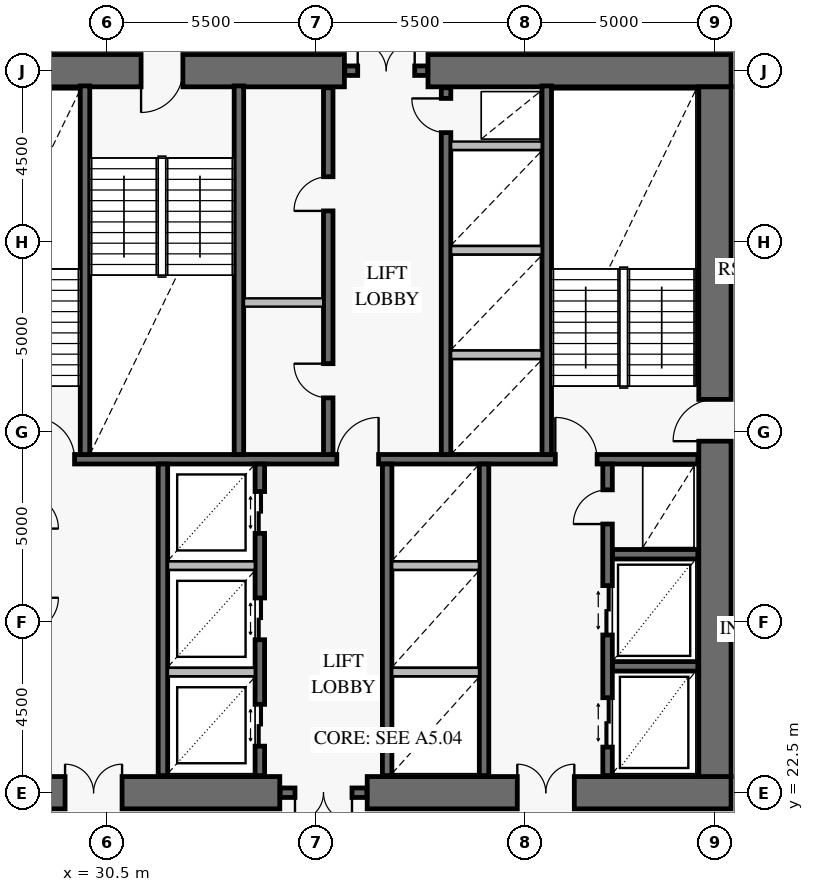
"""IFC4 building model, lengths in metres.
Left out: names, types, materials, properties, quantities, classifications, styles, units other than length and angle.
Written with IfcOpenShell. Run it as: python <this file> out.ifc"""

import sys

from ifc_helpers import new_model, si_unit, direction, frame, frame_2d, origin, place, context, subcontext, project, spatial, rectangle, extrude, element, fill, save


model = new_model("IFC4")
c1 = context("Model", 3, precision=1e-05, world=origin(), true_north=direction((0.0, 1.0)))
c2 = subcontext(c1, "Body", "Model", "MODEL_VIEW")
j1 = project(units=[si_unit("LENGTHUNIT", "METRE"), si_unit("PLANEANGLEUNIT", "RADIAN")], contexts=[c1])
p1 = place(None, origin())
s1 = spatial("IfcSite", under=j1, at=p1, CompositionType="ELEMENT")
p2 = place(p1, origin())
s2 = spatial("IfcBuilding", under=s1, at=p2, CompositionType="ELEMENT")
p3 = place(p2, frame((0.0, 0.0, 7.8)))
s3 = spatial("IfcBuildingStorey", under=s2, at=p3, CompositionType="ELEMENT", Elevation=7.8)
p4 = place(p3, frame((25.075, 22.5, 0.0), z_axis=(0.0, 0.0, 1.0), x_axis=(1.0, 0.0, 0.0)))
e1 = element("IfcWall", 1, at=p4, inside=s3, PredefinedType="SHEAR", context=c2, shape_type="SweptSolid", body=[
    extrude(rectangle(XDim=9.975, YDim=0.85, at=frame_2d((4.988, 0.0))), origin(), (0.0, 0.0, 1.0), 4.2),
])
p5 = place(p4, frame((4.325, 0.0, 0.0)))
e2 = element("IfcOpeningElement", 2, at=p5, cuts=e1, PredefinedType="OPENING", context=c2, shape_type="SweptSolid", body=[
    extrude(rectangle(XDim=1.5, YDim=2.15, at=frame_2d((0.75, 1.075))), frame((0.0, 0.437, 0.0), z_axis=(0.0, -1.0, 0.0), x_axis=(1.0, 0.0, 0.0)), (0.0, 0.0, 1.0), 0.874),
])
p6 = place(p3, frame((37.35, 22.5, 0.0), z_axis=(0.0, 0.0, 1.0), x_axis=(1.0, 0.0, 0.0)))
e3 = element("IfcWall", 3, at=p6, inside=s3, PredefinedType="SHEAR", context=c2, shape_type="SweptSolid", body=[
    extrude(rectangle(XDim=9.575, YDim=0.85, at=frame_2d((4.788, 0.0))), origin(), (0.0, 0.0, 1.0), 4.2),
])
p7 = place(p6, frame((3.95, 0.0, 0.0)))
e4 = element("IfcOpeningElement", 4, at=p7, cuts=e3, PredefinedType="OPENING", context=c2, shape_type="SweptSolid", body=[
    extrude(rectangle(XDim=1.5, YDim=2.15, at=frame_2d((0.75, 1.075))), frame((0.0, 0.437, 0.0), z_axis=(0.0, -1.0, 0.0), x_axis=(1.0, 0.0, 0.0)), (0.0, 0.0, 1.0), 0.874),
])
p8 = place(p3, frame((46.925, 41.5, 0.0), z_axis=(0.0, 0.0, 1.0), x_axis=(-1.0, 0.0, 0.0)))
e5 = element("IfcWall", 5, at=p8, inside=s3, PredefinedType="SHEAR", context=c2, shape_type="SweptSolid", body=[
    extrude(rectangle(XDim=7.975, YDim=0.85, at=frame_2d((3.988, 0.0))), origin(), (0.0, 0.0, 1.0), 4.2),
])
p9 = place(p3, frame((36.75, 41.5, 0.0), z_axis=(0.0, 0.0, 1.0), x_axis=(-1.0, 0.0, 0.0)))
e6 = element("IfcWall", 6, at=p9, inside=s3, PredefinedType="SHEAR", context=c2, shape_type="SweptSolid", body=[
    extrude(rectangle(XDim=11.675, YDim=0.85, at=frame_2d((5.837, 0.0))), origin(), (0.0, 0.0, 1.0), 4.2),
])
p10 = place(p9, frame((4.25, 0.0, 0.0)))
e7 = element("IfcOpeningElement", 7, at=p10, cuts=e6, PredefinedType="OPENING", context=c2, shape_type="SweptSolid", body=[
    extrude(rectangle(XDim=1.1, YDim=2.15, at=frame_2d((0.55, 1.075))), frame((0.0, 0.437, 0.0), z_axis=(0.0, -1.0, 0.0), x_axis=(1.0, 0.0, 0.0)), (0.0, 0.0, 1.0), 0.874),
])
p11 = place(p3, frame((46.5, 22.925, 0.0), z_axis=(0.0, 0.0, 1.0), x_axis=(0.0, 1.0, 0.0)))
e8 = element("IfcWall", 8, at=p11, inside=s3, PredefinedType="SHEAR", context=c2, shape_type="SweptSolid", body=[
    extrude(rectangle(XDim=18.15, YDim=0.85, at=frame_2d((9.075, 0.0))), origin(), (0.0, 0.0, 1.0), 4.2),
])
p12 = place(p11, frame((8.825, 0.0, 0.0)))
e9 = element("IfcOpeningElement", 9, at=p12, cuts=e8, PredefinedType="OPENING", context=c2, shape_type="SweptSolid", body=[
    extrude(rectangle(XDim=1.1, YDim=2.15, at=frame_2d((0.55, 1.075))), frame((0.0, 0.437, 0.0), z_axis=(0.0, -1.0, 0.0), x_axis=(1.0, 0.0, 0.0)), (0.0, 0.0, 1.0), 0.874),
])
p13 = place(p3, frame((35.06, 22.5, 0.0), z_axis=(0.0, 0.0, 1.0), x_axis=(1.0, 0.0, 0.0)))
e10 = element("IfcWall", 10, at=p13, inside=s3, PredefinedType="SOLIDWALL", context=c2, shape_type="SweptSolid", body=[
    extrude(rectangle(XDim=2.28, YDim=0.25, at=frame_2d((1.14, 0.0))), origin(), (0.0, 0.0, 1.0), 4.2),
])
p14 = place(p13, frame((0.39, 0.0, 0.0)))
e11 = element("IfcOpeningElement", 11, at=p14, cuts=e10, PredefinedType="OPENING", context=c2, shape_type="SweptSolid", body=[
    extrude(rectangle(XDim=1.5, YDim=2.15, at=frame_2d((0.75, 1.075))), frame((0.0, 0.137, 0.0), z_axis=(0.0, -1.0, 0.0), x_axis=(1.0, 0.0, 0.0)), (0.0, 0.0, 1.0), 0.274),
])
p15 = place(p3, frame((36.76, 41.5, 0.0), z_axis=(0.0, 0.0, 1.0), x_axis=(1.0, 0.0, 0.0)))
e12 = element("IfcWall", 12, at=p15, inside=s3, PredefinedType="SOLIDWALL", context=c2, shape_type="SweptSolid", body=[
    extrude(rectangle(XDim=2.18, YDim=0.25, at=frame_2d((1.09, 0.0))), origin(), (0.0, 0.0, 1.0), 4.2),
])
p16 = place(p15, frame((0.34, 0.0, 0.0)))
e13 = element("IfcOpeningElement", 13, at=p16, cuts=e12, PredefinedType="OPENING", context=c2, shape_type="SweptSolid", body=[
    extrude(rectangle(XDim=1.5, YDim=2.15, at=frame_2d((0.75, 1.075))), frame((0.0, 0.137, 0.0), z_axis=(0.0, -1.0, 0.0), x_axis=(1.0, 0.0, 0.0)), (0.0, 0.0, 1.0), 0.274),
])
p17 = place(p3, frame((25.95, 31.275, 0.0), z_axis=(0.0, 0.0, 1.0), x_axis=(1.0, 0.0, 0.0)))
e14 = element("IfcWall", 14, at=p17, inside=s3, PredefinedType="SOLIDWALL", context=c2, shape_type="SweptSolid", body=[
    extrude(rectangle(XDim=20.1, YDim=0.25, at=frame_2d((10.05, 0.0))), origin(), (0.0, 0.0, 1.0), 4.2),
])
p18 = place(p17, frame((2.6, 0.0, 0.0)))
e15 = element("IfcOpeningElement", 15, at=p18, cuts=e14, PredefinedType="OPENING", context=c2, shape_type="SweptSolid", body=[
    extrude(rectangle(XDim=1.1, YDim=2.15, at=frame_2d((0.55, 1.075))), frame((0.0, 0.137, 0.0), z_axis=(0.0, -1.0, 0.0), x_axis=(1.0, 0.0, 0.0)), (0.0, 0.0, 1.0), 0.274),
])
p19 = place(p17, frame((10.6, 0.0, 0.0)))
e16 = element("IfcOpeningElement", 16, at=p19, cuts=e14, PredefinedType="OPENING", context=c2, shape_type="SweptSolid", body=[
    extrude(rectangle(XDim=1.1, YDim=2.15, at=frame_2d((0.55, 1.075))), frame((0.0, 0.137, 0.0), z_axis=(0.0, -1.0, 0.0), x_axis=(1.0, 0.0, 0.0)), (0.0, 0.0, 1.0), 0.274),
])
p20 = place(p17, frame((16.35, 0.0, 0.0)))
e17 = element("IfcOpeningElement", 17, at=p20, cuts=e14, PredefinedType="OPENING", context=c2, shape_type="SweptSolid", body=[
    extrude(rectangle(XDim=1.1, YDim=2.15, at=frame_2d((0.55, 1.075))), frame((0.0, 0.137, 0.0), z_axis=(0.0, -1.0, 0.0), x_axis=(1.0, 0.0, 0.0)), (0.0, 0.0, 1.0), 0.274),
])
for number, where, z_axis, x_axis in (
    (18, (29.925, 31.4, 0.0), (0.0, 0.0, 1.0), (0.0, 1.0, 0.0)),
    (19, (33.975, 31.4, 0.0), (0.0, 0.0, 1.0), (0.0, 1.0, 0.0)),
    (20, (42.075, 31.4, 0.0), (0.0, 0.0, 1.0), (0.0, 1.0, 0.0)),
):
    element("IfcWall", number, at=place(p3, frame(where, z_axis=z_axis, x_axis=x_axis)), inside=s3, PredefinedType="SOLIDWALL", context=c2, shape_type="SweptSolid", body=[
        extrude(rectangle(XDim=9.7, YDim=0.25, at=frame_2d((4.85, 0.0))), origin(), (0.0, 0.0, 1.0), 4.2),
    ])
p21 = place(p3, frame((36.325, 31.4, 0.0), z_axis=(0.0, 0.0, 1.0), x_axis=(0.0, 1.0, 0.0)))
e21 = element("IfcWall", 21, at=p21, inside=s3, PredefinedType="SOLIDWALL", context=c2, shape_type="SweptSolid", body=[
    extrude(rectangle(XDim=9.65, YDim=0.25, at=frame_2d((4.825, 0.0))), origin(), (0.0, 0.0, 1.0), 4.2),
])
p22 = place(p21, frame((1.49, 0.0, 0.0)))
e22 = element("IfcOpeningElement", 22, at=p22, cuts=e21, PredefinedType="OPENING", context=c2, shape_type="SweptSolid", body=[
    extrude(rectangle(XDim=0.9, YDim=2.1, at=frame_2d((0.45, 1.05))), frame((0.0, 0.137, 0.0), z_axis=(0.0, -1.0, 0.0), x_axis=(1.0, 0.0, 0.0)), (0.0, 0.0, 1.0), 0.274),
])
p23 = place(p21, frame((6.41, 0.0, 0.0)))
e23 = element("IfcOpeningElement", 23, at=p23, cuts=e21, PredefinedType="OPENING", context=c2, shape_type="SweptSolid", body=[
    extrude(rectangle(XDim=0.9, YDim=2.1, at=frame_2d((0.45, 1.05))), frame((0.0, 0.137, 0.0), z_axis=(0.0, -1.0, 0.0), x_axis=(1.0, 0.0, 0.0)), (0.0, 0.0, 1.0), 0.274),
])
p24 = place(p3, frame((39.425, 31.4, 0.0), z_axis=(0.0, 0.0, 1.0), x_axis=(0.0, 1.0, 0.0)))
e24 = element("IfcWall", 24, at=p24, inside=s3, PredefinedType="SOLIDWALL", context=c2, shape_type="SweptSolid", body=[
    extrude(rectangle(XDim=9.65, YDim=0.25, at=frame_2d((4.825, 0.0))), origin(), (0.0, 0.0, 1.0), 4.2),
])
p25 = place(p24, frame((8.47, 0.0, 0.0)))
e25 = element("IfcOpeningElement", 25, at=p25, cuts=e24, PredefinedType="OPENING", context=c2, shape_type="SweptSolid", body=[
    extrude(rectangle(XDim=0.9, YDim=2.1, at=frame_2d((0.45, 1.05))), frame((0.0, 0.137, 0.0), z_axis=(0.0, -1.0, 0.0), x_axis=(1.0, 0.0, 0.0)), (0.0, 0.0, 1.0), 0.274),
])
p26 = place(p3, frame((31.975, 22.95, 0.0), z_axis=(0.0, 0.0, 1.0), x_axis=(0.0, 1.0, 0.0)))
e26 = element("IfcWall", 26, at=p26, inside=s3, PredefinedType="SOLIDWALL", context=c2, shape_type="SweptSolid", body=[
    extrude(rectangle(XDim=8.2, YDim=0.25, at=frame_2d((4.1, 0.0))), origin(), (0.0, 0.0, 1.0), 4.2),
])
p27 = place(p3, frame((34.525, 22.95, 0.0), z_axis=(0.0, 0.0, 1.0), x_axis=(0.0, 1.0, 0.0)))
e27 = element("IfcWall", 27, at=p27, inside=s3, PredefinedType="SOLIDWALL", context=c2, shape_type="SweptSolid", body=[
    extrude(rectangle(XDim=8.2, YDim=0.25, at=frame_2d((4.1, 0.0))), origin(), (0.0, 0.0, 1.0), 4.2),
])
p28 = place(p27, frame((0.775, 0.0, 0.0)))
e28 = element("IfcOpeningElement", 28, at=p28, cuts=e27, PredefinedType="OPENING", context=c2, shape_type="SweptSolid", body=[
    extrude(rectangle(XDim=1.1, YDim=2.2, at=frame_2d((0.55, 1.1))), frame((0.0, 0.137, 0.0), z_axis=(0.0, -1.0, 0.0), x_axis=(1.0, 0.0, 0.0)), (0.0, 0.0, 1.0), 0.274),
])
p29 = place(p27, frame((3.575, 0.0, 0.0)))
e29 = element("IfcOpeningElement", 29, at=p29, cuts=e27, PredefinedType="OPENING", context=c2, shape_type="SweptSolid", body=[
    extrude(rectangle(XDim=1.1, YDim=2.2, at=frame_2d((0.55, 1.1))), frame((0.0, 0.137, 0.0), z_axis=(0.0, -1.0, 0.0), x_axis=(1.0, 0.0, 0.0)), (0.0, 0.0, 1.0), 0.274),
])
p30 = place(p27, frame((6.375, 0.0, 0.0)))
e30 = element("IfcOpeningElement", 30, at=p30, cuts=e27, PredefinedType="OPENING", context=c2, shape_type="SweptSolid", body=[
    extrude(rectangle(XDim=1.1, YDim=2.2, at=frame_2d((0.55, 1.1))), frame((0.0, 0.137, 0.0), z_axis=(0.0, -1.0, 0.0), x_axis=(1.0, 0.0, 0.0)), (0.0, 0.0, 1.0), 0.274),
])
for number, where, z_axis, x_axis in (
    (31, (37.875, 22.95, 0.0), (0.0, 0.0, 1.0), (0.0, 1.0, 0.0)),
    (32, (40.425, 22.95, 0.0), (0.0, 0.0, 1.0), (0.0, 1.0, 0.0)),
):
    element("IfcWall", number, at=place(p3, frame(where, z_axis=z_axis, x_axis=x_axis)), inside=s3, PredefinedType="SOLIDWALL", context=c2, shape_type="SweptSolid", body=[
        extrude(rectangle(XDim=8.2, YDim=0.25, at=frame_2d((4.1, 0.0))), origin(), (0.0, 0.0, 1.0), 4.2),
    ])
for number, where, z_axis, x_axis in (
    (33, (43.8, 25.825, 0.0), (0.0, 0.0, 1.0), (1.0, 0.0, 0.0)),
    (34, (43.8, 28.775, 0.0), (0.0, 0.0, 1.0), (1.0, 0.0, 0.0)),
):
    element("IfcWall", number, at=place(p3, frame(where, z_axis=z_axis, x_axis=x_axis)), inside=s3, PredefinedType="SOLIDWALL", context=c2, shape_type="SweptSolid", body=[
        extrude(rectangle(XDim=2.25, YDim=0.25, at=frame_2d((1.125, 0.0))), origin(), (0.0, 0.0, 1.0), 4.2),
    ])
p31 = place(p3, frame((43.675, 22.95, 0.0), z_axis=(0.0, 0.0, 1.0), x_axis=(0.0, 1.0, 0.0)))
e35 = element("IfcWall", 35, at=p31, inside=s3, PredefinedType="SOLIDWALL", context=c2, shape_type="SweptSolid", body=[
    extrude(rectangle(XDim=8.2, YDim=0.25, at=frame_2d((4.1, 0.0))), origin(), (0.0, 0.0, 1.0), 4.2),
])
p32 = place(p31, frame((0.75, 0.0, 0.0)))
e36 = element("IfcOpeningElement", 36, at=p32, cuts=e35, PredefinedType="OPENING", context=c2, shape_type="SweptSolid", body=[
    extrude(rectangle(XDim=1.3, YDim=2.3, at=frame_2d((0.65, 1.15))), frame((0.0, 0.137, 0.0), z_axis=(0.0, -1.0, 0.0), x_axis=(1.0, 0.0, 0.0)), (0.0, 0.0, 1.0), 0.274),
])
p33 = place(p31, frame((3.7, 0.0, 0.0)))
e37 = element("IfcOpeningElement", 37, at=p33, cuts=e35, PredefinedType="OPENING", context=c2, shape_type="SweptSolid", body=[
    extrude(rectangle(XDim=1.3, YDim=2.3, at=frame_2d((0.65, 1.15))), frame((0.0, 0.137, 0.0), z_axis=(0.0, -1.0, 0.0), x_axis=(1.0, 0.0, 0.0)), (0.0, 0.0, 1.0), 0.274),
])
p34 = place(p31, frame((6.62, 0.0, 0.0)))
e38 = element("IfcOpeningElement", 38, at=p34, cuts=e35, PredefinedType="OPENING", context=c2, shape_type="SweptSolid", body=[
    extrude(rectangle(XDim=0.9, YDim=2.1, at=frame_2d((0.45, 1.05))), frame((0.0, 0.137, 0.0), z_axis=(0.0, -1.0, 0.0), x_axis=(1.0, 0.0, 0.0)), (0.0, 0.0, 1.0), 0.274),
])
p35 = place(p3, frame((34.108, 35.4, 0.0), z_axis=(0.0, 0.0, 1.0), x_axis=(1.0, 0.0, 0.0)))
e39 = element("IfcWall", 39, at=p35, inside=s3, PredefinedType="PARTITIONING", context=c2, shape_type="SweptSolid", body=[
    extrude(rectangle(XDim=2.084, YDim=0.22, at=frame_2d((1.042, 0.0))), origin(), (0.0, 0.0, 1.0), 3.92),
])
for number, where, z_axis, x_axis in (
    (40, (39.558, 34.025, 0.0), (0.0, 0.0, 1.0), (1.0, 0.0, 0.0)),
    (41, (39.558, 36.775, 0.0), (0.0, 0.0, 1.0), (1.0, 0.0, 0.0)),
    (42, (39.558, 39.525, 0.0), (0.0, 0.0, 1.0), (1.0, 0.0, 0.0)),
):
    element("IfcWall", number, at=place(p3, frame(where, z_axis=z_axis, x_axis=x_axis)), inside=s3, PredefinedType="PARTITIONING", context=c2, shape_type="SweptSolid", body=[
        extrude(rectangle(XDim=2.384, YDim=0.22, at=frame_2d((1.192, 0.0))), origin(), (0.0, 0.0, 1.0), 3.92),
    ])
for number, where, z_axis, x_axis in (
    (43, (32.108, 25.675, 0.0), (0.0, 0.0, 1.0), (1.0, 0.0, 0.0)),
    (44, (32.108, 28.475, 0.0), (0.0, 0.0, 1.0), (1.0, 0.0, 0.0)),
):
    element("IfcWall", number, at=place(p3, frame(where, z_axis=z_axis, x_axis=x_axis)), inside=s3, PredefinedType="PARTITIONING", context=c2, shape_type="SweptSolid", body=[
        extrude(rectangle(XDim=2.284, YDim=0.22, at=frame_2d((1.142, 0.0))), origin(), (0.0, 0.0, 1.0), 3.92),
    ])
for number, where, z_axis, x_axis in (
    (45, (38.008, 25.675, 0.0), (0.0, 0.0, 1.0), (1.0, 0.0, 0.0)),
    (46, (38.008, 28.475, 0.0), (0.0, 0.0, 1.0), (1.0, 0.0, 0.0)),
):
    element("IfcWall", number, at=place(p3, frame(where, z_axis=z_axis, x_axis=x_axis)), inside=s3, PredefinedType="PARTITIONING", context=c2, shape_type="SweptSolid", body=[
        extrude(rectangle(XDim=2.284, YDim=0.22, at=frame_2d((1.142, 0.0))), origin(), (0.0, 0.0, 1.0), 3.92),
    ])
p36 = place(p12, origin())
e47 = element("IfcDoor", 47, at=p36, inside=s3, OperationType="SINGLE_SWING_LEFT", PredefinedType="USERDEFINED", context=c2, shape_type="SweptSolid", body=[
    extrude(rectangle(XDim=1.1, YDim=2.15, at=frame_2d((0.55, 1.075))), frame((0.0, 0.025, 0.0), z_axis=(0.0, -1.0, 0.0), x_axis=(1.0, 0.0, 0.0)), (0.0, 0.0, 1.0), 0.05),
])
fill(e9, e47)
p37 = place(p10, origin())
e48 = element("IfcDoor", 48, at=p37, inside=s3, OperationType="SINGLE_SWING_RIGHT", PredefinedType="USERDEFINED", context=c2, shape_type="SweptSolid", body=[
    extrude(rectangle(XDim=1.1, YDim=2.15, at=frame_2d((0.55, 1.075))), frame((0.0, 0.025, 0.0), z_axis=(0.0, -1.0, 0.0), x_axis=(1.0, 0.0, 0.0)), (0.0, 0.0, 1.0), 0.05),
])
fill(e7, e48)
p38 = place(p5, origin())
e49 = element("IfcDoor", 49, at=p38, inside=s3, OperationType="DOUBLE_DOOR_SINGLE_SWING", PredefinedType="DOOR", context=c2, shape_type="SweptSolid", body=[
    extrude(rectangle(XDim=1.5, YDim=2.15, at=frame_2d((0.75, 1.075))), frame((0.0, 0.025, 0.0), z_axis=(0.0, -1.0, 0.0), x_axis=(1.0, 0.0, 0.0)), (0.0, 0.0, 1.0), 0.05),
])
fill(e2, e49)
p39 = place(p7, origin())
e50 = element("IfcDoor", 50, at=p39, inside=s3, OperationType="DOUBLE_DOOR_SINGLE_SWING", PredefinedType="DOOR", context=c2, shape_type="SweptSolid", body=[
    extrude(rectangle(XDim=1.5, YDim=2.15, at=frame_2d((0.75, 1.075))), frame((0.0, 0.025, 0.0), z_axis=(0.0, -1.0, 0.0), x_axis=(1.0, 0.0, 0.0)), (0.0, 0.0, 1.0), 0.05),
])
fill(e4, e50)
p40 = place(p14, frame((1.5, 0.0, 0.0), z_axis=(0.0, 0.0, 1.0), x_axis=(-1.0, 0.0, 0.0)))
e51 = element("IfcDoor", 51, at=p40, inside=s3, OperationType="DOUBLE_DOOR_SINGLE_SWING", PredefinedType="DOOR", context=c2, shape_type="SweptSolid", body=[
    extrude(rectangle(XDim=1.5, YDim=2.15, at=frame_2d((0.75, 1.075))), frame((0.0, 0.025, 0.0), z_axis=(0.0, -1.0, 0.0), x_axis=(1.0, 0.0, 0.0)), (0.0, 0.0, 1.0), 0.05),
])
fill(e11, e51)
p41 = place(p16, origin())
e52 = element("IfcDoor", 52, at=p41, inside=s3, OperationType="DOUBLE_DOOR_SINGLE_SWING", PredefinedType="DOOR", context=c2, shape_type="SweptSolid", body=[
    extrude(rectangle(XDim=1.5, YDim=2.15, at=frame_2d((0.75, 1.075))), frame((0.0, 0.025, 0.0), z_axis=(0.0, -1.0, 0.0), x_axis=(1.0, 0.0, 0.0)), (0.0, 0.0, 1.0), 0.05),
])
fill(e13, e52)
p42 = place(p18, origin())
e53 = element("IfcDoor", 53, at=p42, inside=s3, OperationType="SINGLE_SWING_LEFT", PredefinedType="USERDEFINED", context=c2, shape_type="SweptSolid", body=[
    extrude(rectangle(XDim=1.1, YDim=2.15, at=frame_2d((0.55, 1.075))), frame((0.0, 0.025, 0.0), z_axis=(0.0, -1.0, 0.0), x_axis=(1.0, 0.0, 0.0)), (0.0, 0.0, 1.0), 0.05),
])
fill(e15, e53)
p43 = place(p19, origin())
e54 = element("IfcDoor", 54, at=p43, inside=s3, OperationType="SINGLE_SWING_RIGHT", PredefinedType="USERDEFINED", context=c2, shape_type="SweptSolid", body=[
    extrude(rectangle(XDim=1.1, YDim=2.15, at=frame_2d((0.55, 1.075))), frame((0.0, 0.025, 0.0), z_axis=(0.0, -1.0, 0.0), x_axis=(1.0, 0.0, 0.0)), (0.0, 0.0, 1.0), 0.05),
])
fill(e16, e54)
p44 = place(p20, origin())
e55 = element("IfcDoor", 55, at=p44, inside=s3, OperationType="SINGLE_SWING_LEFT", PredefinedType="USERDEFINED", context=c2, shape_type="SweptSolid", body=[
    extrude(rectangle(XDim=1.1, YDim=2.15, at=frame_2d((0.55, 1.075))), frame((0.0, 0.025, 0.0), z_axis=(0.0, -1.0, 0.0), x_axis=(1.0, 0.0, 0.0)), (0.0, 0.0, 1.0), 0.05),
])
fill(e17, e55)
p45 = place(p22, origin())
e56 = element("IfcDoor", 56, at=p45, inside=s3, OperationType="SINGLE_SWING_RIGHT", PredefinedType="DOOR", context=c2, shape_type="SweptSolid", body=[
    extrude(rectangle(XDim=0.9, YDim=2.1, at=frame_2d((0.45, 1.05))), frame((0.0, 0.025, 0.0), z_axis=(0.0, -1.0, 0.0), x_axis=(1.0, 0.0, 0.0)), (0.0, 0.0, 1.0), 0.05),
])
fill(e22, e56)
p46 = place(p23, origin())
e57 = element("IfcDoor", 57, at=p46, inside=s3, OperationType="SINGLE_SWING_LEFT", PredefinedType="DOOR", context=c2, shape_type="SweptSolid", body=[
    extrude(rectangle(XDim=0.9, YDim=2.1, at=frame_2d((0.45, 1.05))), frame((0.0, 0.025, 0.0), z_axis=(0.0, -1.0, 0.0), x_axis=(1.0, 0.0, 0.0)), (0.0, 0.0, 1.0), 0.05),
])
fill(e23, e57)
p47 = place(p25, origin())
e58 = element("IfcDoor", 58, at=p47, inside=s3, OperationType="SINGLE_SWING_RIGHT", PredefinedType="DOOR", context=c2, shape_type="SweptSolid", body=[
    extrude(rectangle(XDim=0.9, YDim=2.1, at=frame_2d((0.45, 1.05))), frame((0.0, 0.025, 0.0), z_axis=(0.0, -1.0, 0.0), x_axis=(1.0, 0.0, 0.0)), (0.0, 0.0, 1.0), 0.05),
])
fill(e25, e58)
p48 = place(p28, frame((1.1, 0.0, 0.0), z_axis=(0.0, 0.0, 1.0), x_axis=(-1.0, 0.0, 0.0)))
e59 = element("IfcDoor", 59, at=p48, inside=s3, OperationType="DOUBLE_DOOR_SLIDING", PredefinedType="DOOR", context=c2, shape_type="SweptSolid", body=[
    extrude(rectangle(XDim=1.1, YDim=2.2, at=frame_2d((0.55, 1.1))), frame((0.0, 0.025, 0.0), z_axis=(0.0, -1.0, 0.0), x_axis=(1.0, 0.0, 0.0)), (0.0, 0.0, 1.0), 0.05),
])
fill(e28, e59)
p49 = place(p29, frame((1.1, 0.0, 0.0), z_axis=(0.0, 0.0, 1.0), x_axis=(-1.0, 0.0, 0.0)))
e60 = element("IfcDoor", 60, at=p49, inside=s3, OperationType="DOUBLE_DOOR_SLIDING", PredefinedType="DOOR", context=c2, shape_type="SweptSolid", body=[
    extrude(rectangle(XDim=1.1, YDim=2.2, at=frame_2d((0.55, 1.1))), frame((0.0, 0.025, 0.0), z_axis=(0.0, -1.0, 0.0), x_axis=(1.0, 0.0, 0.0)), (0.0, 0.0, 1.0), 0.05),
])
fill(e29, e60)
p50 = place(p30, frame((1.1, 0.0, 0.0), z_axis=(0.0, 0.0, 1.0), x_axis=(-1.0, 0.0, 0.0)))
e61 = element("IfcDoor", 61, at=p50, inside=s3, OperationType="DOUBLE_DOOR_SLIDING", PredefinedType="DOOR", context=c2, shape_type="SweptSolid", body=[
    extrude(rectangle(XDim=1.1, YDim=2.2, at=frame_2d((0.55, 1.1))), frame((0.0, 0.025, 0.0), z_axis=(0.0, -1.0, 0.0), x_axis=(1.0, 0.0, 0.0)), (0.0, 0.0, 1.0), 0.05),
])
fill(e30, e61)
p51 = place(p32, origin())
e62 = element("IfcDoor", 62, at=p51, inside=s3, OperationType="DOUBLE_DOOR_SLIDING", PredefinedType="DOOR", context=c2, shape_type="SweptSolid", body=[
    extrude(rectangle(XDim=1.3, YDim=2.3, at=frame_2d((0.65, 1.15))), frame((0.0, 0.025, 0.0), z_axis=(0.0, -1.0, 0.0), x_axis=(1.0, 0.0, 0.0)), (0.0, 0.0, 1.0), 0.05),
])
fill(e36, e62)
p52 = place(p33, origin())
e63 = element("IfcDoor", 63, at=p52, inside=s3, OperationType="DOUBLE_DOOR_SLIDING", PredefinedType="DOOR", context=c2, shape_type="SweptSolid", body=[
    extrude(rectangle(XDim=1.3, YDim=2.3, at=frame_2d((0.65, 1.15))), frame((0.0, 0.025, 0.0), z_axis=(0.0, -1.0, 0.0), x_axis=(1.0, 0.0, 0.0)), (0.0, 0.0, 1.0), 0.05),
])
fill(e37, e63)
p53 = place(p34, origin())
e64 = element("IfcDoor", 64, at=p53, inside=s3, OperationType="SINGLE_SWING_LEFT", PredefinedType="DOOR", context=c2, shape_type="SweptSolid", body=[
    extrude(rectangle(XDim=0.9, YDim=2.1, at=frame_2d((0.45, 1.05))), frame((0.0, 0.025, 0.0), z_axis=(0.0, -1.0, 0.0), x_axis=(1.0, 0.0, 0.0)), (0.0, 0.0, 1.0), 0.05),
])
fill(e38, e64)
save(model, sys.argv[1])
